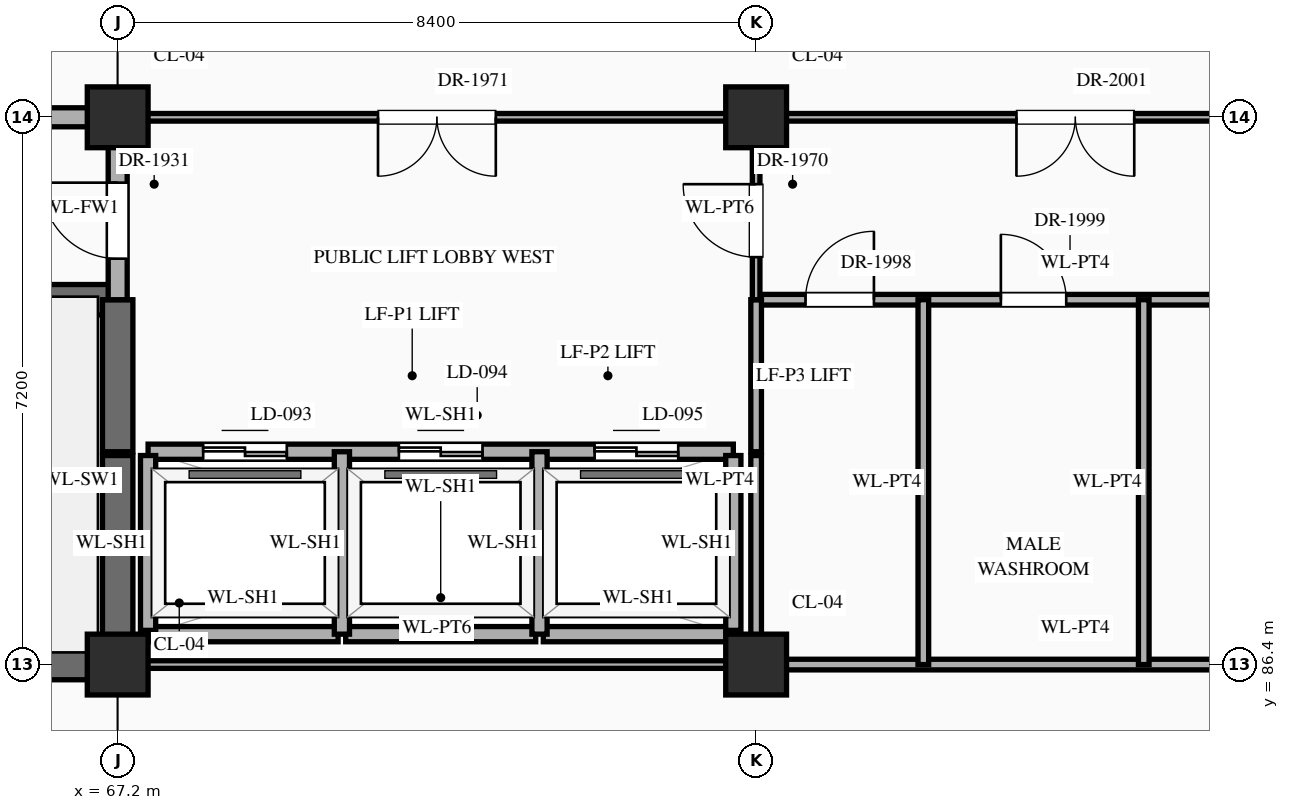
"""IFC4 building model, lengths in metres.
Left out: names, types, materials, properties, quantities, classifications, styles, units other than length and angle.
Written with IfcOpenShell. Run it as: python <this file> out.ifc"""

import sys

from ifc_helpers import new_model, si_unit, direction, frame, frame_2d, origin, origin_2d, place, context, subcontext, project, spatial, rectangle, extrude, element, fill, save


model = new_model("IFC4")
c1 = context("Model", 3, precision=1e-05, world=origin(), true_north=direction((0.0, 1.0)))
c2 = subcontext(c1, "Body", "Model", "MODEL_VIEW")
j1 = project(units=[si_unit("LENGTHUNIT", "METRE"), si_unit("PLANEANGLEUNIT", "RADIAN")], contexts=[c1])
p1 = place(None, origin())
s1 = spatial("IfcSite", under=j1, at=p1, CompositionType="ELEMENT")
p2 = place(p1, origin())
s2 = spatial("IfcBuilding", under=s1, at=p2, CompositionType="ELEMENT")
p3 = place(p2, frame((0.0, 0.0, 21.6)))
s3 = spatial("IfcBuildingStorey", under=s2, at=p3, CompositionType="ELEMENT", Elevation=21.6)
for number, where, z_axis, x_axis in (
    (1, (67.2, 86.4, 0.0), (0.0, 0.0, 1.0), (1.0, 0.0, 0.0)),
    (2, (67.2, 93.6, 0.0), (0.0, 0.0, 1.0), (1.0, 0.0, 0.0)),
    (3, (75.6, 86.4, 0.0), (0.0, 0.0, 1.0), (1.0, 0.0, 0.0)),
    (4, (75.6, 93.6, 0.0), (0.0, 0.0, 1.0), (1.0, 0.0, 0.0)),
):
    element("IfcColumn", number, at=place(p3, frame(where, z_axis=z_axis, x_axis=x_axis)), inside=s3, PredefinedType="COLUMN", context=c2, shape_type="SweptSolid", body=[
        extrude(rectangle(XDim=0.8, YDim=0.8, at=origin_2d()), origin(), (0.0, 0.0, 1.0), 4.5),
    ])
p4 = place(p3, frame((58.8, 86.4, 0.0), z_axis=(0.0, 0.0, 1.0), x_axis=(1.0, 0.0, 0.0)))
e5 = element("IfcWall", 5, at=p4, inside=s3, PredefinedType="SHEAR", context=c2, shape_type="SweptSolid", body=[
    extrude(rectangle(XDim=8.4, YDim=0.4, at=frame_2d((4.2, 0.0))), origin(), (0.0, 0.0, 1.0), 4.24),
])
p5 = place(p3, frame((67.25, 86.4, 0.0), z_axis=(0.0, 0.0, 1.0), x_axis=(1.0, 0.0, 0.0)))
e6 = element("IfcWall", 6, at=p5, inside=s3, PredefinedType="STANDARD", context=c2, shape_type="SweptSolid", body=[
    extrude(rectangle(XDim=8.3, YDim=0.1, at=frame_2d((4.15, 0.0))), origin(), (0.0, 0.0, 1.0), 3.39),
])
p6 = place(p3, frame((75.6, 86.4, 0.0), z_axis=(0.0, 0.0, 1.0), x_axis=(1.0, 0.0, 0.0)))
e7 = element("IfcWall", 7, at=p6, inside=s3, PredefinedType="STANDARD", context=c2, shape_type="SweptSolid", body=[
    extrude(rectangle(XDim=8.4, YDim=0.14, at=frame_2d((4.2, 0.0))), origin(), (0.0, 0.0, 1.0), 3.39),
])
for number, where, z_axis, x_axis in (
    (8, (67.6, 86.8, 0.0), (0.0, 0.0, 1.0), (1.0, 0.0, 0.0)),
    (9, (70.2, 86.8, 0.0), (0.0, 0.0, 1.0), (1.0, 0.0, 0.0)),
    (10, (72.8, 86.8, 0.0), (0.0, 0.0, 1.0), (1.0, 0.0, 0.0)),
):
    element("IfcWall", number, at=place(p3, frame(where, z_axis=z_axis, x_axis=x_axis)), inside=s3, PredefinedType="STANDARD", context=c2, shape_type="SweptSolid", body=[
        extrude(rectangle(XDim=2.5, YDim=0.2, at=frame_2d((1.25, 0.0))), origin(), (0.0, 0.0, 1.0), 4.24),
    ])
p7 = place(p3, frame((67.6, 89.2, 0.0), z_axis=(0.0, 0.0, 1.0), x_axis=(1.0, 0.0, 0.0)))
e11 = element("IfcWall", 11, at=p7, inside=s3, PredefinedType="STANDARD", context=c2, shape_type="SweptSolid", body=[
    extrude(rectangle(XDim=7.7, YDim=0.2, at=frame_2d((3.85, 0.0))), origin(), (0.0, 0.0, 1.0), 4.24),
])
p8 = place(p7, frame((0.725, 0.0, 0.0)))
e12 = element("IfcOpeningElement", 12, at=p8, cuts=e11, PredefinedType="OPENING", context=c2, shape_type="SweptSolid", body=[
    extrude(rectangle(XDim=1.1, YDim=2.15, at=frame_2d((0.55, 1.075))), frame((0.0, 0.112, 0.0), z_axis=(0.0, -1.0, 0.0), x_axis=(1.0, 0.0, 0.0)), (0.0, 0.0, 1.0), 0.224),
])
p9 = place(p7, frame((3.3, 0.0, 0.0)))
e13 = element("IfcOpeningElement", 13, at=p9, cuts=e11, PredefinedType="OPENING", context=c2, shape_type="SweptSolid", body=[
    extrude(rectangle(XDim=1.1, YDim=2.15, at=frame_2d((0.55, 1.075))), frame((0.0, 0.112, 0.0), z_axis=(0.0, -1.0, 0.0), x_axis=(1.0, 0.0, 0.0)), (0.0, 0.0, 1.0), 0.224),
])
p10 = place(p7, frame((5.875, 0.0, 0.0)))
e14 = element("IfcOpeningElement", 14, at=p10, cuts=e11, PredefinedType="OPENING", context=c2, shape_type="SweptSolid", body=[
    extrude(rectangle(XDim=1.1, YDim=2.15, at=frame_2d((0.55, 1.075))), frame((0.0, 0.112, 0.0), z_axis=(0.0, -1.0, 0.0), x_axis=(1.0, 0.0, 0.0)), (0.0, 0.0, 1.0), 0.224),
])
p11 = place(p3, frame((58.8, 91.2, 0.0), z_axis=(0.0, 0.0, 1.0), x_axis=(1.0, 0.0, 0.0)))
e15 = element("IfcWall", 15, at=p11, inside=s3, PredefinedType="SHEAR", context=c2, shape_type="SweptSolid", body=[
    extrude(rectangle(XDim=8.4, YDim=0.4, at=frame_2d((4.2, 0.0))), origin(), (0.0, 0.0, 1.0), 4.24),
])
p12 = place(p11, frame((0.65, 0.0, 0.0)))
e16 = element("IfcOpeningElement", 16, at=p12, cuts=e15, PredefinedType="OPENING", context=c2, shape_type="SweptSolid", body=[
    extrude(rectangle(XDim=1.1, YDim=2.2, at=frame_2d((0.55, 1.1))), frame((0.0, 0.212, 0.0), z_axis=(0.0, -1.0, 0.0), x_axis=(1.0, 0.0, 0.0)), (0.0, 0.0, 1.0), 0.424),
])
p13 = place(p3, frame((75.6, 91.2, 0.0), z_axis=(0.0, 0.0, 1.0), x_axis=(1.0, 0.0, 0.0)))
e17 = element("IfcWall", 17, at=p13, inside=s3, PredefinedType="STANDARD", context=c2, shape_type="SweptSolid", body=[
    extrude(rectangle(XDim=8.4, YDim=0.14, at=frame_2d((4.2, 0.0))), origin(), (0.0, 0.0, 1.0), 4.24),
])
p14 = place(p13, frame((0.65, 0.0, 0.0)))
e18 = element("IfcOpeningElement", 18, at=p14, cuts=e17, PredefinedType="OPENING", context=c2, shape_type="SweptSolid", body=[
    extrude(rectangle(XDim=0.9, YDim=2.15, at=frame_2d((0.45, 1.075))), frame((0.0, 0.082, 0.0), z_axis=(0.0, -1.0, 0.0), x_axis=(1.0, 0.0, 0.0)), (0.0, 0.0, 1.0), 0.164),
])
p15 = place(p13, frame((3.22, 0.0, 0.0)))
e19 = element("IfcOpeningElement", 19, at=p15, cuts=e17, PredefinedType="OPENING", context=c2, shape_type="SweptSolid", body=[
    extrude(rectangle(XDim=0.86, YDim=2.1, at=frame_2d((0.43, 1.05))), frame((0.0, 0.082, 0.0), z_axis=(0.0, -1.0, 0.0), x_axis=(1.0, 0.0, 0.0)), (0.0, 0.0, 1.0), 0.164),
])
p16 = place(p13, frame((6.32, 0.0, 0.0)))
e20 = element("IfcOpeningElement", 20, at=p16, cuts=e17, PredefinedType="OPENING", context=c2, shape_type="SweptSolid", body=[
    extrude(rectangle(XDim=0.86, YDim=2.1, at=frame_2d((0.43, 1.05))), frame((0.0, 0.082, 0.0), z_axis=(0.0, -1.0, 0.0), x_axis=(1.0, 0.0, 0.0)), (0.0, 0.0, 1.0), 0.164),
])
p17 = place(p3, frame((58.8, 93.6, 0.0), z_axis=(0.0, 0.0, 1.0), x_axis=(1.0, 0.0, 0.0)))
e21 = element("IfcWall", 21, at=p17, inside=s3, PredefinedType="STANDARD", context=c2, shape_type="SweptSolid", body=[
    extrude(rectangle(XDim=8.4, YDim=0.25, at=frame_2d((4.2, 0.0))), origin(), (0.0, 0.0, 1.0), 3.39),
])
p18 = place(p17, frame((3.3, 0.0, 0.0)))
e22 = element("IfcOpeningElement", 22, at=p18, cuts=e21, PredefinedType="OPENING", context=c2, shape_type="SweptSolid", body=[
    extrude(rectangle(XDim=1.8, YDim=2.35, at=frame_2d((0.9, 1.175))), frame((0.0, 0.137, 0.0), z_axis=(0.0, -1.0, 0.0), x_axis=(1.0, 0.0, 0.0)), (0.0, 0.0, 1.0), 0.274),
])
p19 = place(p3, frame((67.2, 93.6, 0.0), z_axis=(0.0, 0.0, 1.0), x_axis=(1.0, 0.0, 0.0)))
e23 = element("IfcWall", 23, at=p19, inside=s3, PredefinedType="STANDARD", context=c2, shape_type="SweptSolid", body=[
    extrude(rectangle(XDim=33.6, YDim=0.1, at=frame_2d((16.8, 0.0))), origin(), (0.0, 0.0, 1.0), 3.39),
])
p20 = place(p19, frame((3.425, 0.0, 0.0)))
e24 = element("IfcOpeningElement", 24, at=p20, cuts=e23, PredefinedType="OPENING", context=c2, shape_type="SweptSolid", body=[
    extrude(rectangle(XDim=1.55, YDim=2.35, at=frame_2d((0.775, 1.175))), frame((0.0, 0.062, 0.0), z_axis=(0.0, -1.0, 0.0), x_axis=(1.0, 0.0, 0.0)), (0.0, 0.0, 1.0), 0.124),
])
p21 = place(p19, frame((28.55, 0.0, 0.0)))
e25 = element("IfcOpeningElement", 25, at=p21, cuts=e23, PredefinedType="OPENING", context=c2, shape_type="SweptSolid", body=[
    extrude(rectangle(XDim=1.7, YDim=2.45, at=frame_2d((0.85, 1.225))), frame((0.0, 0.062, 0.0), z_axis=(0.0, -1.0, 0.0), x_axis=(1.0, 0.0, 0.0)), (0.0, 0.0, 1.0), 0.124),
])
p22 = place(p19, frame((11.825, 0.0, 0.0)))
e26 = element("IfcOpeningElement", 26, at=p22, cuts=e23, PredefinedType="OPENING", context=c2, shape_type="SweptSolid", body=[
    extrude(rectangle(XDim=1.55, YDim=2.35, at=frame_2d((0.775, 1.175))), frame((0.0, 0.062, 0.0), z_axis=(0.0, -1.0, 0.0), x_axis=(1.0, 0.0, 0.0)), (0.0, 0.0, 1.0), 0.124),
])
p23 = place(p19, frame((17.85, 0.0, 0.0)))
e27 = element("IfcOpeningElement", 27, at=p23, cuts=e23, PredefinedType="OPENING", context=c2, shape_type="SweptSolid", body=[
    extrude(rectangle(XDim=1.02, YDim=2.4, at=frame_2d((0.51, 1.2))), frame((0.0, 0.062, 0.0), z_axis=(0.0, -1.0, 0.0), x_axis=(1.0, 0.0, 0.0)), (0.0, 0.0, 1.0), 0.124),
])
p24 = place(p19, frame((20.47, 0.0, 0.0)))
e28 = element("IfcOpeningElement", 28, at=p24, cuts=e23, PredefinedType="OPENING", context=c2, shape_type="SweptSolid", body=[
    extrude(rectangle(XDim=1.06, YDim=2.4, at=frame_2d((0.53, 1.2))), frame((0.0, 0.062, 0.0), z_axis=(0.0, -1.0, 0.0), x_axis=(1.0, 0.0, 0.0)), (0.0, 0.0, 1.0), 0.124),
])
p25 = place(p19, frame((23.07, 0.0, 0.0)))
e29 = element("IfcOpeningElement", 29, at=p25, cuts=e23, PredefinedType="OPENING", context=c2, shape_type="SweptSolid", body=[
    extrude(rectangle(XDim=1.14, YDim=2.4, at=frame_2d((0.57, 1.2))), frame((0.0, 0.062, 0.0), z_axis=(0.0, -1.0, 0.0), x_axis=(1.0, 0.0, 0.0)), (0.0, 0.0, 1.0), 0.124),
])
p26 = place(p3, frame((67.2, 86.45, 0.0), z_axis=(0.0, 0.0, 1.0), x_axis=(0.0, 1.0, 0.0)))
e30 = element("IfcWall", 30, at=p26, inside=s3, PredefinedType="SHEAR", context=c2, shape_type="SweptSolid", body=[
    extrude(rectangle(XDim=2.7, YDim=0.4, at=frame_2d((1.35, 0.0))), origin(), (0.0, 0.0, 1.0), 4.24),
])
p27 = place(p3, frame((67.2, 89.2, 0.0), z_axis=(0.0, 0.0, 1.0), x_axis=(0.0, 1.0, 0.0)))
e31 = element("IfcWall", 31, at=p27, inside=s3, PredefinedType="SHEAR", context=c2, shape_type="SweptSolid", body=[
    extrude(rectangle(XDim=2.0, YDim=0.4, at=frame_2d((1.0, 0.0))), origin(), (0.0, 0.0, 1.0), 4.24),
])
p28 = place(p3, frame((67.2, 91.2, 0.0), z_axis=(0.0, 0.0, 1.0), x_axis=(0.0, 1.0, 0.0)))
e32 = element("IfcWall", 32, at=p28, inside=s3, PredefinedType="STANDARD", context=c2, shape_type="SweptSolid", body=[
    extrude(rectangle(XDim=2.4, YDim=0.25, at=frame_2d((1.2, 0.0))), origin(), (0.0, 0.0, 1.0), 3.49),
])
p29 = place(p28, frame((0.54, 0.0, 0.0)))
e33 = element("IfcOpeningElement", 33, at=p29, cuts=e32, PredefinedType="OPENING", context=c2, shape_type="SweptSolid", body=[
    extrude(rectangle(XDim=1.0, YDim=2.2, at=frame_2d((0.5, 1.1))), frame((0.0, 0.137, 0.0), z_axis=(0.0, -1.0, 0.0), x_axis=(1.0, 0.0, 0.0)), (0.0, 0.0, 1.0), 0.274),
])
p30 = place(p3, frame((67.6, 86.85, 0.0), z_axis=(0.0, 0.0, 1.0), x_axis=(0.0, 1.0, 0.0)))
e34 = element("IfcWall", 34, at=p30, inside=s3, PredefinedType="STANDARD", context=c2, shape_type="SweptSolid", body=[
    extrude(rectangle(XDim=2.3, YDim=0.2, at=frame_2d((1.15, 0.0))), origin(), (0.0, 0.0, 1.0), 4.24),
])
for number, where, z_axis, x_axis in (
    (35, (70.15, 86.8, 0.0), (0.0, 0.0, 1.0), (0.0, 1.0, 0.0)),
    (36, (72.75, 86.8, 0.0), (0.0, 0.0, 1.0), (0.0, 1.0, 0.0)),
):
    element("IfcWall", number, at=place(p3, frame(where, z_axis=z_axis, x_axis=x_axis)), inside=s3, PredefinedType="STANDARD", context=c2, shape_type="SweptSolid", body=[
        extrude(rectangle(XDim=2.4, YDim=0.2, at=frame_2d((1.2, 0.0))), origin(), (0.0, 0.0, 1.0), 4.24),
    ])
p31 = place(p3, frame((75.3, 86.85, 0.0), z_axis=(0.0, 0.0, 1.0), x_axis=(0.0, 1.0, 0.0)))
e37 = element("IfcWall", 37, at=p31, inside=s3, PredefinedType="STANDARD", context=c2, shape_type="SweptSolid", body=[
    extrude(rectangle(XDim=2.3, YDim=0.2, at=frame_2d((1.15, 0.0))), origin(), (0.0, 0.0, 1.0), 4.24),
])
p32 = place(p3, frame((75.6, 86.45, 0.0), z_axis=(0.0, 0.0, 1.0), x_axis=(0.0, 1.0, 0.0)))
e38 = element("IfcWall", 38, at=p32, inside=s3, PredefinedType="STANDARD", context=c2, shape_type="SweptSolid", body=[
    extrude(rectangle(XDim=2.7, YDim=0.14, at=frame_2d((1.35, 0.0))), origin(), (0.0, 0.0, 1.0), 3.49),
])
p33 = place(p3, frame((75.6, 89.2, 0.0), z_axis=(0.0, 0.0, 1.0), x_axis=(0.0, 1.0, 0.0)))
e39 = element("IfcWall", 39, at=p33, inside=s3, PredefinedType="STANDARD", context=c2, shape_type="SweptSolid", body=[
    extrude(rectangle(XDim=2.0, YDim=0.14, at=frame_2d((1.0, 0.0))), origin(), (0.0, 0.0, 1.0), 3.49),
])
p34 = place(p3, frame((75.6, 91.2, 0.0), z_axis=(0.0, 0.0, 1.0), x_axis=(0.0, 1.0, 0.0)))
e40 = element("IfcWall", 40, at=p34, inside=s3, PredefinedType="STANDARD", context=c2, shape_type="SweptSolid", body=[
    extrude(rectangle(XDim=2.4, YDim=0.1, at=frame_2d((1.2, 0.0))), origin(), (0.0, 0.0, 1.0), 3.49),
])
p35 = place(p34, frame((0.56, 0.0, 0.0)))
e41 = element("IfcOpeningElement", 41, at=p35, cuts=e40, PredefinedType="OPENING", context=c2, shape_type="SweptSolid", body=[
    extrude(rectangle(XDim=0.96, YDim=2.2, at=frame_2d((0.48, 1.1))), frame((0.0, 0.062, 0.0), z_axis=(0.0, -1.0, 0.0), x_axis=(1.0, 0.0, 0.0)), (0.0, 0.0, 1.0), 0.124),
])
for number, where, z_axis, x_axis in (
    (42, (77.8, 86.4, 0.0), (0.0, 0.0, 1.0), (0.0, 1.0, 0.0)),
    (43, (80.7, 86.4, 0.0), (0.0, 0.0, 1.0), (0.0, 1.0, 0.0)),
):
    element("IfcWall", number, at=place(p3, frame(where, z_axis=z_axis, x_axis=x_axis)), inside=s3, PredefinedType="STANDARD", context=c2, shape_type="SweptSolid", body=[
        extrude(rectangle(XDim=4.8, YDim=0.14, at=frame_2d((2.4, 0.0))), origin(), (0.0, 0.0, 1.0), 4.24),
    ])
p36 = place(p8, origin())
e44 = element("IfcDoor", 44, at=p36, inside=s3, OperationType="DOUBLE_DOOR_SLIDING", PredefinedType="DOOR", context=c2, shape_type="SweptSolid", body=[
    extrude(rectangle(XDim=1.1, YDim=2.15, at=frame_2d((0.55, 1.075))), frame((0.0, 0.025, 0.0), z_axis=(0.0, -1.0, 0.0), x_axis=(1.0, 0.0, 0.0)), (0.0, 0.0, 1.0), 0.05),
])
fill(e12, e44)
p37 = place(p9, origin())
e45 = element("IfcDoor", 45, at=p37, inside=s3, OperationType="DOUBLE_DOOR_SLIDING", PredefinedType="DOOR", context=c2, shape_type="SweptSolid", body=[
    extrude(rectangle(XDim=1.1, YDim=2.15, at=frame_2d((0.55, 1.075))), frame((0.0, 0.025, 0.0), z_axis=(0.0, -1.0, 0.0), x_axis=(1.0, 0.0, 0.0)), (0.0, 0.0, 1.0), 0.05),
])
fill(e13, e45)
p38 = place(p10, origin())
e46 = element("IfcDoor", 46, at=p38, inside=s3, OperationType="DOUBLE_DOOR_SLIDING", PredefinedType="DOOR", context=c2, shape_type="SweptSolid", body=[
    extrude(rectangle(XDim=1.1, YDim=2.15, at=frame_2d((0.55, 1.075))), frame((0.0, 0.025, 0.0), z_axis=(0.0, -1.0, 0.0), x_axis=(1.0, 0.0, 0.0)), (0.0, 0.0, 1.0), 0.05),
])
fill(e14, e46)
p39 = place(p29, origin())
e47 = element("IfcDoor", 47, at=p39, inside=s3, OperationType="SINGLE_SWING_RIGHT", PredefinedType="DOOR", context=c2, shape_type="SweptSolid", body=[
    extrude(rectangle(XDim=1.0, YDim=2.2, at=frame_2d((0.5, 1.1))), frame((0.0, 0.025, 0.0), z_axis=(0.0, -1.0, 0.0), x_axis=(1.0, 0.0, 0.0)), (0.0, 0.0, 1.0), 0.05),
])
fill(e33, e47)
p40 = place(p35, origin())
e48 = element("IfcDoor", 48, at=p40, inside=s3, OperationType="SINGLE_SWING_RIGHT", PredefinedType="DOOR", context=c2, shape_type="SweptSolid", body=[
    extrude(rectangle(XDim=0.96, YDim=2.2, at=frame_2d((0.48, 1.1))), frame((0.0, 0.025, 0.0), z_axis=(0.0, -1.0, 0.0), x_axis=(1.0, 0.0, 0.0)), (0.0, 0.0, 1.0), 0.05),
])
fill(e41, e48)
p41 = place(p20, frame((1.55, 0.0, 0.0), z_axis=(0.0, 0.0, 1.0), x_axis=(-1.0, 0.0, 0.0)))
e49 = element("IfcDoor", 49, at=p41, inside=s3, OperationType="DOUBLE_DOOR_SINGLE_SWING", PredefinedType="DOOR", context=c2, shape_type="SweptSolid", body=[
    extrude(rectangle(XDim=1.55, YDim=2.35, at=frame_2d((0.775, 1.175))), frame((0.0, 0.025, 0.0), z_axis=(0.0, -1.0, 0.0), x_axis=(1.0, 0.0, 0.0)), (0.0, 0.0, 1.0), 0.05),
])
fill(e24, e49)
p42 = place(p14, origin())
e50 = element("IfcDoor", 50, at=p42, inside=s3, OperationType="SINGLE_SWING_RIGHT", PredefinedType="DOOR", context=c2, shape_type="SweptSolid", body=[
    extrude(rectangle(XDim=0.9, YDim=2.15, at=frame_2d((0.45, 1.075))), frame((0.0, 0.025, 0.0), z_axis=(0.0, -1.0, 0.0), x_axis=(1.0, 0.0, 0.0)), (0.0, 0.0, 1.0), 0.05),
])
fill(e18, e50)
p43 = place(p15, origin())
e51 = element("IfcDoor", 51, at=p43, inside=s3, OperationType="SINGLE_SWING_LEFT", PredefinedType="DOOR", context=c2, shape_type="SweptSolid", body=[
    extrude(rectangle(XDim=0.86, YDim=2.1, at=frame_2d((0.43, 1.05))), frame((0.0, 0.025, 0.0), z_axis=(0.0, -1.0, 0.0), x_axis=(1.0, 0.0, 0.0)), (0.0, 0.0, 1.0), 0.05),
])
fill(e19, e51)
p44 = place(p22, frame((1.55, 0.0, 0.0), z_axis=(0.0, 0.0, 1.0), x_axis=(-1.0, 0.0, 0.0)))
e52 = element("IfcDoor", 52, at=p44, inside=s3, OperationType="DOUBLE_DOOR_SINGLE_SWING", PredefinedType="DOOR", context=c2, shape_type="SweptSolid", body=[
    extrude(rectangle(XDim=1.55, YDim=2.35, at=frame_2d((0.775, 1.175))), frame((0.0, 0.025, 0.0), z_axis=(0.0, -1.0, 0.0), x_axis=(1.0, 0.0, 0.0)), (0.0, 0.0, 1.0), 0.05),
])
fill(e26, e52)
save(model, sys.argv[1])
